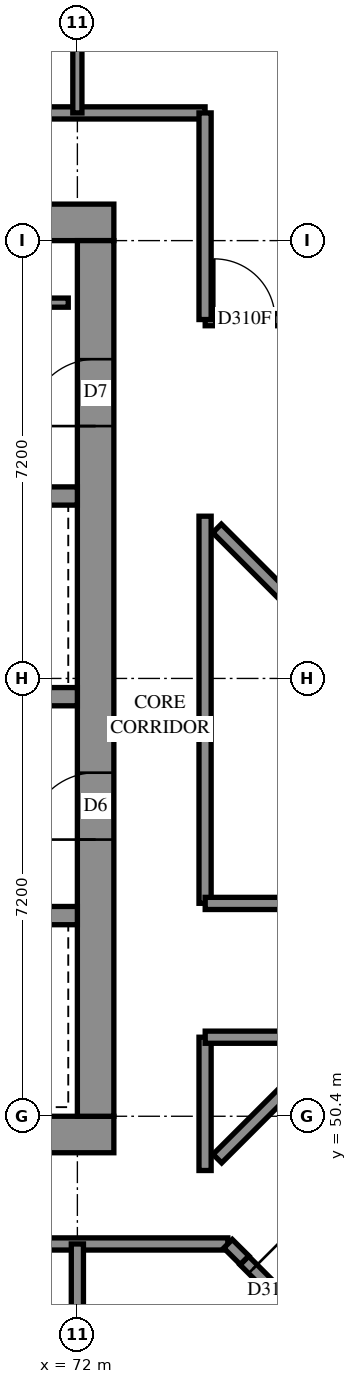
"""IFC4 building model, lengths in metres.
Left out: names, types, materials, properties, quantities, classifications, styles, units other than length and angle.
Written with IfcOpenShell. Run it as: python <this file> out.ifc"""

import sys

from ifc_helpers import new_model, si_unit, direction, frame, frame_2d, origin, place, context, subcontext, project, spatial, rectangle, extrude, element, fill, save


model = new_model("IFC4")
c1 = context("Model", 3, precision=1e-05, world=origin(), true_north=direction((0.0, 1.0)))
c2 = subcontext(c1, "Body", "Model", "MODEL_VIEW")
j1 = project(units=[si_unit("LENGTHUNIT", "METRE"), si_unit("PLANEANGLEUNIT", "RADIAN")], contexts=[c1])
p1 = place(None, origin())
s1 = spatial("IfcSite", under=j1, at=p1, CompositionType="ELEMENT")
p2 = place(p1, origin())
s2 = spatial("IfcBuilding", under=s1, at=p2, CompositionType="ELEMENT")
p3 = place(p2, frame((0.0, 0.0, 149.0)))
s3 = spatial("IfcBuildingStorey", under=s2, at=p3, CompositionType="ELEMENT", Elevation=149.0)
p4 = place(p3, frame((57.0, 50.1, -0.3), z_axis=(0.0, 0.0, 1.0), x_axis=(1.0, 0.0, 0.0)))
e1 = element("IfcWall", 1, at=p4, inside=s3, PredefinedType="SHEAR", context=c2, shape_type="SweptSolid", body=[
    extrude(rectangle(XDim=15.6, YDim=0.6, at=frame_2d((7.8, 0.0))), origin(), (0.0, 0.0, 1.0), 2.7),
])
p5 = place(p3, frame((57.0, 65.1, -0.3), z_axis=(0.0, 0.0, 1.0), x_axis=(1.0, 0.0, 0.0)))
e2 = element("IfcWall", 2, at=p5, inside=s3, PredefinedType="SHEAR", context=c2, shape_type="SweptSolid", body=[
    extrude(rectangle(XDim=15.6, YDim=0.6, at=frame_2d((7.8, 0.0))), origin(), (0.0, 0.0, 1.0), 2.7),
])
p6 = place(p5, frame((10.6, 0.0, 0.3)))
e3 = element("IfcOpeningElement", 3, at=p6, cuts=e2, PredefinedType="OPENING", context=c2, shape_type="SweptSolid", body=[
    extrude(rectangle(XDim=0.8, YDim=2.1, at=frame_2d((0.4, 1.05))), frame((0.0, 0.31, 0.0), z_axis=(0.0, -1.0, 0.0), x_axis=(1.0, 0.0, 0.0)), (0.0, 0.0, 1.0), 0.62),
])
p7 = place(p3, frame((72.3, 50.4, -0.3), z_axis=(0.0, 0.0, 1.0), x_axis=(0.0, 1.0, 0.0)))
e4 = element("IfcWall", 4, at=p7, inside=s3, PredefinedType="SHEAR", context=c2, shape_type="SweptSolid", body=[
    extrude(rectangle(XDim=14.4, YDim=0.6, at=frame_2d((7.2, 0.0))), origin(), (0.0, 0.0, 1.0), 2.7),
])
p8 = place(p7, frame((4.55, 0.0, 0.3)))
e5 = element("IfcOpeningElement", 5, at=p8, cuts=e4, PredefinedType="OPENING", context=c2, shape_type="SweptSolid", body=[
    extrude(rectangle(XDim=1.1, YDim=2.1, at=frame_2d((0.55, 1.05))), frame((0.0, 0.31, 0.0), z_axis=(0.0, -1.0, 0.0), x_axis=(1.0, 0.0, 0.0)), (0.0, 0.0, 1.0), 0.62),
])
p9 = place(p7, frame((11.35, 0.0, 0.3)))
e6 = element("IfcOpeningElement", 6, at=p9, cuts=e4, PredefinedType="OPENING", context=c2, shape_type="SweptSolid", body=[
    extrude(rectangle(XDim=1.1, YDim=2.1, at=frame_2d((0.55, 1.05))), frame((0.0, 0.31, 0.0), z_axis=(0.0, -1.0, 0.0), x_axis=(1.0, 0.0, 0.0)), (0.0, 0.0, 1.0), 0.62),
])
p10 = place(p3, frame((57.6, 53.7, 0.0), z_axis=(0.0, 0.0, 1.0), x_axis=(1.0, 0.0, 0.0)))
e7 = element("IfcWall", 7, at=p10, inside=s3, PredefinedType="SOLIDWALL", context=c2, shape_type="SweptSolid", body=[
    extrude(rectangle(XDim=14.4, YDim=0.3, at=frame_2d((7.2, 0.0))), origin(), (0.0, 0.0, 1.0), 3.1),
])
p11 = place(p10, frame((1.35, 0.0, 0.0)))
e8 = element("IfcOpeningElement", 8, at=p11, cuts=e7, PredefinedType="OPENING", context=c2, shape_type="SweptSolid", body=[
    extrude(rectangle(XDim=0.9, YDim=2.1, at=frame_2d((0.45, 1.05))), frame((0.0, 0.16, 0.0), z_axis=(0.0, -1.0, 0.0), x_axis=(1.0, 0.0, 0.0)), (0.0, 0.0, 1.0), 0.32),
])
p12 = place(p10, frame((4.95, 0.0, 0.0)))
e9 = element("IfcOpeningElement", 9, at=p12, cuts=e7, PredefinedType="OPENING", context=c2, shape_type="SweptSolid", body=[
    extrude(rectangle(XDim=0.9, YDim=2.1, at=frame_2d((0.45, 1.05))), frame((0.0, 0.16, 0.0), z_axis=(0.0, -1.0, 0.0), x_axis=(1.0, 0.0, 0.0)), (0.0, 0.0, 1.0), 0.32),
])
p13 = place(p10, frame((8.55, 0.0, 0.0)))
e10 = element("IfcOpeningElement", 10, at=p13, cuts=e7, PredefinedType="OPENING", context=c2, shape_type="SweptSolid", body=[
    extrude(rectangle(XDim=0.9, YDim=2.1, at=frame_2d((0.45, 1.05))), frame((0.0, 0.16, 0.0), z_axis=(0.0, -1.0, 0.0), x_axis=(1.0, 0.0, 0.0)), (0.0, 0.0, 1.0), 0.32),
])
p14 = place(p10, frame((12.05, 0.0, 0.0)))
e11 = element("IfcOpeningElement", 11, at=p14, cuts=e7, PredefinedType="OPENING", context=c2, shape_type="SweptSolid", body=[
    extrude(rectangle(XDim=1.1, YDim=2.1, at=frame_2d((0.55, 1.05))), frame((0.0, 0.16, 0.0), z_axis=(0.0, -1.0, 0.0), x_axis=(1.0, 0.0, 0.0)), (0.0, 0.0, 1.0), 0.32),
])
p15 = place(p3, frame((57.6, 57.3, 0.0), z_axis=(0.0, 0.0, 1.0), x_axis=(1.0, 0.0, 0.0)))
e12 = element("IfcWall", 12, at=p15, inside=s3, PredefinedType="SOLIDWALL", context=c2, shape_type="SweptSolid", body=[
    extrude(rectangle(XDim=14.4, YDim=0.3, at=frame_2d((7.2, 0.0))), origin(), (0.0, 0.0, 1.0), 3.1),
])
p16 = place(p15, frame((1.25, 0.0, 0.0)))
e13 = element("IfcOpeningElement", 13, at=p16, cuts=e12, PredefinedType="OPENING", context=c2, shape_type="SweptSolid", body=[
    extrude(rectangle(XDim=1.1, YDim=2.1, at=frame_2d((0.55, 1.05))), frame((0.0, 0.16, 0.0), z_axis=(0.0, -1.0, 0.0), x_axis=(1.0, 0.0, 0.0)), (0.0, 0.0, 1.0), 0.32),
])
p17 = place(p15, frame((4.85, 0.0, 0.0)))
e14 = element("IfcOpeningElement", 14, at=p17, cuts=e12, PredefinedType="OPENING", context=c2, shape_type="SweptSolid", body=[
    extrude(rectangle(XDim=1.1, YDim=2.1, at=frame_2d((0.55, 1.05))), frame((0.0, 0.16, 0.0), z_axis=(0.0, -1.0, 0.0), x_axis=(1.0, 0.0, 0.0)), (0.0, 0.0, 1.0), 0.32),
])
p18 = place(p15, frame((8.45, 0.0, 0.0)))
e15 = element("IfcOpeningElement", 15, at=p18, cuts=e12, PredefinedType="OPENING", context=c2, shape_type="SweptSolid", body=[
    extrude(rectangle(XDim=1.1, YDim=2.1, at=frame_2d((0.55, 1.05))), frame((0.0, 0.16, 0.0), z_axis=(0.0, -1.0, 0.0), x_axis=(1.0, 0.0, 0.0)), (0.0, 0.0, 1.0), 0.32),
])
p19 = place(p15, frame((12.05, 0.0, 0.0)))
e16 = element("IfcOpeningElement", 16, at=p19, cuts=e12, PredefinedType="OPENING", context=c2, shape_type="SweptSolid", body=[
    extrude(rectangle(XDim=1.1, YDim=2.1, at=frame_2d((0.55, 1.05))), frame((0.0, 0.16, 0.0), z_axis=(0.0, -1.0, 0.0), x_axis=(1.0, 0.0, 0.0)), (0.0, 0.0, 1.0), 0.32),
])
p20 = place(p3, frame((64.8, 60.6, 0.0), z_axis=(0.0, 0.0, 1.0), x_axis=(1.0, 0.0, 0.0)))
e17 = element("IfcWall", 17, at=p20, inside=s3, PredefinedType="SOLIDWALL", context=c2, shape_type="SweptSolid", body=[
    extrude(rectangle(XDim=7.2, YDim=0.3, at=frame_2d((3.6, 0.0))), origin(), (0.0, 0.0, 1.0), 3.1),
])
p21 = place(p3, frame((64.95, 63.78, 0.0), z_axis=(0.0, 0.0, 1.0), x_axis=(1.0, 0.0, 0.0)))
e18 = element("IfcWall", 18, at=p21, inside=s3, PredefinedType="PARTITIONING", context=c2, shape_type="SweptSolid", body=[
    extrude(rectangle(XDim=6.9, YDim=0.15, at=frame_2d((3.45, 0.0))), origin(), (0.0, 0.0, 1.0), 3.1),
])
p22 = place(p3, frame((55.5, 48.3, 0.0), z_axis=(0.0, 0.0, 1.0), x_axis=(1.0, 0.0, 0.0)))
e19 = element("IfcWall", 19, at=p22, inside=s3, PredefinedType="PARTITIONING", context=c2, shape_type="SweptSolid", body=[
    extrude(rectangle(XDim=18.974, YDim=0.2, at=frame_2d((9.487, 0.0))), origin(), (0.0, 0.0, 1.0), 3.1),
])
p23 = place(p22, frame((4.4, 0.0, 0.0)))
e20 = element("IfcOpeningElement", 20, at=p23, cuts=e19, PredefinedType="OPENING", context=c2, shape_type="SweptSolid", body=[
    extrude(rectangle(XDim=0.9, YDim=2.1, at=frame_2d((0.45, 1.05))), frame((0.0, 0.11, 0.0), z_axis=(0.0, -1.0, 0.0), x_axis=(1.0, 0.0, 0.0)), (0.0, 0.0, 1.0), 0.22),
])
p24 = place(p22, frame((6.1, 0.0, 0.0)))
e21 = element("IfcOpeningElement", 21, at=p24, cuts=e19, PredefinedType="OPENING", context=c2, shape_type="SweptSolid", body=[
    extrude(rectangle(XDim=0.9, YDim=2.1, at=frame_2d((0.45, 1.05))), frame((0.0, 0.11, 0.0), z_axis=(0.0, -1.0, 0.0), x_axis=(1.0, 0.0, 0.0)), (0.0, 0.0, 1.0), 0.22),
])
p25 = place(p22, frame((13.162, 0.0, 0.0)))
e22 = element("IfcOpeningElement", 22, at=p25, cuts=e19, PredefinedType="OPENING", context=c2, shape_type="SweptSolid", body=[
    extrude(rectangle(XDim=1.0, YDim=2.1, at=frame_2d((0.5, 1.05))), frame((0.0, 0.11, 0.0), z_axis=(0.0, -1.0, 0.0), x_axis=(1.0, 0.0, 0.0)), (0.0, 0.0, 1.0), 0.22),
])
p26 = place(p3, frame((55.5, 66.9, 0.0), z_axis=(0.0, 0.0, 1.0), x_axis=(1.0, 0.0, 0.0)))
e23 = element("IfcWall", 23, at=p26, inside=s3, PredefinedType="PARTITIONING", context=c2, shape_type="SweptSolid", body=[
    extrude(rectangle(XDim=18.6, YDim=0.2, at=frame_2d((9.3, 0.0))), origin(), (0.0, 0.0, 1.0), 3.1),
])
p27 = place(p26, frame((4.4, 0.0, 0.0)))
e24 = element("IfcOpeningElement", 24, at=p27, cuts=e23, PredefinedType="OPENING", context=c2, shape_type="SweptSolid", body=[
    extrude(rectangle(XDim=0.9, YDim=2.1, at=frame_2d((0.45, 1.05))), frame((0.0, 0.11, 0.0), z_axis=(0.0, -1.0, 0.0), x_axis=(1.0, 0.0, 0.0)), (0.0, 0.0, 1.0), 0.22),
])
p28 = place(p26, frame((6.1, 0.0, 0.0)))
e25 = element("IfcOpeningElement", 25, at=p28, cuts=e23, PredefinedType="OPENING", context=c2, shape_type="SweptSolid", body=[
    extrude(rectangle(XDim=0.9, YDim=2.1, at=frame_2d((0.45, 1.05))), frame((0.0, 0.11, 0.0), z_axis=(0.0, -1.0, 0.0), x_axis=(1.0, 0.0, 0.0)), (0.0, 0.0, 1.0), 0.22),
])
p29 = place(p26, frame((11.65, 0.0, 0.0)))
e26 = element("IfcOpeningElement", 26, at=p29, cuts=e23, PredefinedType="OPENING", context=c2, shape_type="SweptSolid", body=[
    extrude(rectangle(XDim=0.9, YDim=2.1, at=frame_2d((0.45, 1.05))), frame((0.0, 0.11, 0.0), z_axis=(0.0, -1.0, 0.0), x_axis=(1.0, 0.0, 0.0)), (0.0, 0.0, 1.0), 0.22),
])
p30 = place(p26, frame((13.3, 0.0, 0.0)))
e27 = element("IfcOpeningElement", 27, at=p30, cuts=e23, PredefinedType="OPENING", context=c2, shape_type="SweptSolid", body=[
    extrude(rectangle(XDim=0.9, YDim=2.1, at=frame_2d((0.45, 1.05))), frame((0.0, 0.11, 0.0), z_axis=(0.0, -1.0, 0.0), x_axis=(1.0, 0.0, 0.0)), (0.0, 0.0, 1.0), 0.22),
])
p31 = place(p3, frame((74.1, 53.902, 0.0), z_axis=(0.0, 0.0, 1.0), x_axis=(0.0, 1.0, 0.0)))
e28 = element("IfcWall", 28, at=p31, inside=s3, PredefinedType="PARTITIONING", context=c2, shape_type="SweptSolid", body=[
    extrude(rectangle(XDim=6.366, YDim=0.2, at=frame_2d((3.183, 0.0))), origin(), (0.0, 0.0, 1.0), 3.1),
])
p32 = place(p3, frame((74.102, 63.5, 0.0), z_axis=(0.0, 0.0, 1.0), x_axis=(1.0, 0.0, 0.0)))
e29 = element("IfcWall", 29, at=p32, inside=s3, PredefinedType="PARTITIONING", context=c2, shape_type="SweptSolid", body=[
    extrude(rectangle(XDim=5.098, YDim=0.2, at=frame_2d((2.549, 0.0))), origin(), (0.0, 0.0, 1.0), 3.1),
])
p33 = place(p32, frame((0.149, 0.0, 0.0)))
e30 = element("IfcOpeningElement", 30, at=p33, cuts=e29, PredefinedType="OPENING", context=c2, shape_type="SweptSolid", body=[
    extrude(rectangle(XDim=1.0, YDim=2.1, at=frame_2d((0.5, 1.05))), frame((0.0, 0.11, 0.0), z_axis=(0.0, -1.0, 0.0), x_axis=(1.0, 0.0, 0.0)), (0.0, 0.0, 1.0), 0.22),
])
p34 = place(p32, frame((3.688, 0.0, 0.0)))
e31 = element("IfcOpeningElement", 31, at=p34, cuts=e29, PredefinedType="OPENING", context=c2, shape_type="SweptSolid", body=[
    extrude(rectangle(XDim=0.9, YDim=2.1, at=frame_2d((0.45, 1.05))), frame((0.0, 0.11, 0.0), z_axis=(0.0, -1.0, 0.0), x_axis=(1.0, 0.0, 0.0)), (0.0, 0.0, 1.0), 0.22),
])
p35 = place(p3, frame((72.0, 43.65, 0.0), z_axis=(0.0, 0.0, 1.0), x_axis=(0.0, 1.0, 0.0)))
e32 = element("IfcWall", 32, at=p35, inside=s3, PredefinedType="PARTITIONING", context=c2, shape_type="SweptSolid", body=[
    extrude(rectangle(XDim=4.65, YDim=0.2, at=frame_2d((2.325, 0.0))), origin(), (0.0, 0.0, 1.0), 3.1),
])
p36 = place(p3, frame((74.745, 48.029, 0.0), z_axis=(0.0, 0.0, 1.0), x_axis=(0.7068806156, -0.7073328745, 0.0)))
e33 = element("IfcWall", 33, at=p36, inside=s3, PredefinedType="PARTITIONING", context=c2, shape_type="SweptSolid", body=[
    extrude(rectangle(XDim=4.422, YDim=0.2, at=frame_2d((2.211, 0.0))), origin(), (0.0, 0.0, 1.0), 3.1),
])
p37 = place(p36, frame((0.199, 0.0, 0.0)))
e34 = element("IfcOpeningElement", 34, at=p37, cuts=e33, PredefinedType="OPENING", context=c2, shape_type="SweptSolid", body=[
    extrude(rectangle(XDim=1.0, YDim=2.1, at=frame_2d((0.5, 1.05))), frame((0.0, 0.11, 0.0), z_axis=(0.0, -1.0, 0.0), x_axis=(1.0, 0.0, 0.0)), (0.0, 0.0, 1.0), 0.22),
])
p38 = place(p3, frame((74.102, 53.9, 0.0), z_axis=(0.0, 0.0, 1.0), x_axis=(1.0, 0.0, 0.0)))
e35 = element("IfcWall", 35, at=p38, inside=s3, PredefinedType="PARTITIONING", context=c2, shape_type="SweptSolid", body=[
    extrude(rectangle(XDim=4.392, YDim=0.2, at=frame_2d((2.196, 0.0))), origin(), (0.0, 0.0, 1.0), 3.1),
])
p39 = place(p38, frame((1.415, 0.0, 0.0)))
e36 = element("IfcOpeningElement", 36, at=p39, cuts=e35, PredefinedType="OPENING", context=c2, shape_type="SweptSolid", body=[
    extrude(rectangle(XDim=1.0, YDim=2.1, at=frame_2d((0.5, 1.05))), frame((0.0, 0.11, 0.0), z_axis=(0.0, -1.0, 0.0), x_axis=(1.0, 0.0, 0.0)), (0.0, 0.0, 1.0), 0.22),
])
p40 = place(p3, frame((74.1, 63.502, 0.0), z_axis=(0.0, 0.0, 1.0), x_axis=(0.0, 1.0, 0.0)))
e37 = element("IfcWall", 37, at=p40, inside=s3, PredefinedType="PARTITIONING", context=c2, shape_type="SweptSolid", body=[
    extrude(rectangle(XDim=3.398, YDim=0.2, at=frame_2d((1.699, 0.0))), origin(), (0.0, 0.0, 1.0), 3.1),
])
p41 = place(p3, frame((74.302, 49.704, 0.0), z_axis=(0.0, 0.0, 1.0), x_axis=(0.7074614873, 0.706751897, 0.0)))
e38 = element("IfcWall", 38, at=p41, inside=s3, PredefinedType="PARTITIONING", context=c2, shape_type="SweptSolid", body=[
    extrude(rectangle(XDim=2.818, YDim=0.2, at=frame_2d((1.409, 0.0))), origin(), (0.0, 0.0, 1.0), 3.1),
])
p42 = place(p3, frame((72.0, 66.9, 0.0), z_axis=(0.0, 0.0, 1.0), x_axis=(0.0, 1.0, 0.0)))
e39 = element("IfcWall", 39, at=p42, inside=s3, PredefinedType="PARTITIONING", context=c2, shape_type="SweptSolid", body=[
    extrude(rectangle(XDim=2.4, YDim=0.15, at=frame_2d((1.2, 0.0))), origin(), (0.0, 0.0, 1.0), 3.1),
])
p43 = place(p3, frame((74.297, 60.067, 0.0), z_axis=(0.0, 0.0, 1.0), x_axis=(0.7071067812, -0.7071067812, 0.0)))
e40 = element("IfcWall", 40, at=p43, inside=s3, PredefinedType="PARTITIONING", context=c2, shape_type="SweptSolid", body=[
    extrude(rectangle(XDim=2.229, YDim=0.2, at=frame_2d((1.114, 0.0))), origin(), (0.0, 0.0, 1.0), 3.1),
])
p44 = place(p3, frame((74.1, 49.508, 0.0), z_axis=(0.0, 0.0, 1.0), x_axis=(0.0, 1.0, 0.0)))
e41 = element("IfcWall", 41, at=p44, inside=s3, PredefinedType="PARTITIONING", context=c2, shape_type="SweptSolid", body=[
    extrude(rectangle(XDim=2.192, YDim=0.2, at=frame_2d((1.096, 0.0))), origin(), (0.0, 0.0, 1.0), 3.1),
])
p45 = place(p3, frame((74.102, 51.7, 0.0), z_axis=(0.0, 0.0, 1.0), x_axis=(1.0, 0.0, 0.0)))
e42 = element("IfcWall", 42, at=p45, inside=s3, PredefinedType="PARTITIONING", context=c2, shape_type="SweptSolid", body=[
    extrude(rectangle(XDim=2.19, YDim=0.2, at=frame_2d((1.095, 0.0))), origin(), (0.0, 0.0, 1.0), 3.1),
])
p46 = place(p3, frame((74.477, 48.303, 0.0), z_axis=(0.0, 0.0, 1.0), x_axis=(0.7097111995, -0.7044927348, 0.0)))
e43 = element("IfcWall", 43, at=p46, inside=s3, PredefinedType="PARTITIONING", context=c2, shape_type="SweptSolid", body=[
    extrude(rectangle(XDim=0.383, YDim=0.2, at=frame_2d((0.192, 0.0))), origin(), (0.0, 0.0, 1.0), 3.1),
])
p47 = place(p8, origin())
e44 = element("IfcDoor", 44, at=p47, inside=s3, OperationType="DOUBLE_DOOR_SINGLE_SWING", PredefinedType="DOOR", context=c2, shape_type="SweptSolid", body=[
    extrude(rectangle(XDim=1.1, YDim=2.1, at=frame_2d((0.55, 1.05))), frame((0.0, 0.025, 0.0), z_axis=(0.0, -1.0, 0.0), x_axis=(1.0, 0.0, 0.0)), (0.0, 0.0, 1.0), 0.05),
])
fill(e5, e44)
p48 = place(p9, origin())
e45 = element("IfcDoor", 45, at=p48, inside=s3, OperationType="SINGLE_SWING_RIGHT", PredefinedType="DOOR", context=c2, shape_type="SweptSolid", body=[
    extrude(rectangle(XDim=1.1, YDim=2.1, at=frame_2d((0.55, 1.05))), frame((0.0, 0.025, 0.0), z_axis=(0.0, -1.0, 0.0), x_axis=(1.0, 0.0, 0.0)), (0.0, 0.0, 1.0), 0.05),
])
fill(e6, e45)
p49 = place(p33, origin())
e46 = element("IfcDoor", 46, at=p49, inside=s3, OperationType="SINGLE_SWING_RIGHT", PredefinedType="DOOR", context=c2, shape_type="SweptSolid", body=[
    extrude(rectangle(XDim=1.0, YDim=2.1, at=frame_2d((0.5, 1.05))), frame((0.0, 0.025, 0.0), z_axis=(0.0, -1.0, 0.0), x_axis=(1.0, 0.0, 0.0)), (0.0, 0.0, 1.0), 0.05),
])
fill(e30, e46)
p50 = place(p37, origin())
e47 = element("IfcDoor", 47, at=p50, inside=s3, OperationType="SINGLE_SWING_LEFT", PredefinedType="DOOR", context=c2, shape_type="SweptSolid", body=[
    extrude(rectangle(XDim=1.0, YDim=2.1, at=frame_2d((0.5, 1.05))), frame((0.0, 0.025, 0.0), z_axis=(0.0, -1.0, 0.0), x_axis=(1.0, 0.0, 0.0)), (0.0, 0.0, 1.0), 0.05),
])
fill(e34, e47)
save(model, sys.argv[1])
